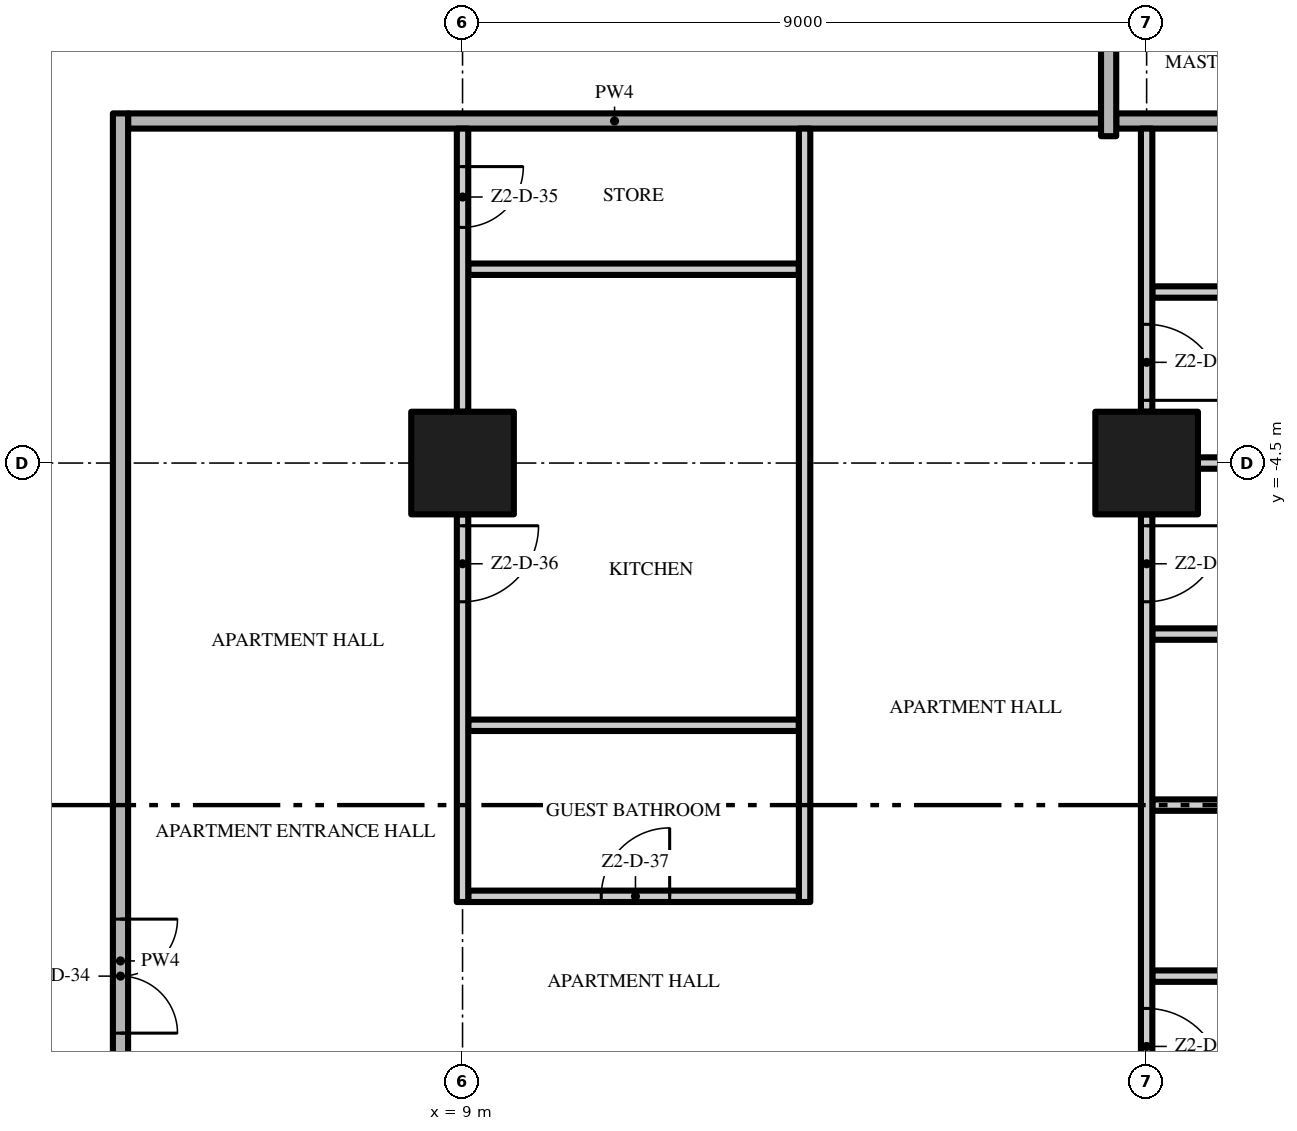
"""IFC4 building model, lengths in metres.
Left out: names, types, materials, properties, quantities, classifications, styles, units other than length and angle.
Written with IfcOpenShell. Run it as: python <this file> out.ifc"""

import sys

from ifc_helpers import new_model, si_unit, direction, frame, frame_2d, origin, origin_2d, place, context, subcontext, project, spatial, rectangle, extrude, element, fill, save


model = new_model("IFC4")
c1 = context("Model", 3, precision=1e-05, world=origin(), true_north=direction((0.0, 1.0)))
c2 = subcontext(c1, "Body", "Model", "MODEL_VIEW")
j1 = project(units=[si_unit("LENGTHUNIT", "METRE"), si_unit("PLANEANGLEUNIT", "RADIAN")], contexts=[c1])
p1 = place(None, origin())
s1 = spatial("IfcSite", under=j1, at=p1, CompositionType="ELEMENT")
p2 = place(p1, origin())
s2 = spatial("IfcBuilding", under=s1, at=p2, CompositionType="ELEMENT")
p3 = place(p2, frame((0.0, 0.0, 107.4)))
s3 = spatial("IfcBuildingStorey", under=s2, at=p3, CompositionType="ELEMENT", Elevation=107.4)
for number, where, z_axis, x_axis in (
    (1, (18.0, -4.5, 0.0), (0.0, 0.0, 1.0), (1.0, 0.0, 0.0)),
    (2, (9.0, -4.5, 0.0), (0.0, 0.0, 1.0), (1.0, 0.0, 0.0)),
):
    element("IfcColumn", number, at=place(p3, frame(where, z_axis=z_axis, x_axis=x_axis)), inside=s3, PredefinedType="COLUMN", context=c2, shape_type="SweptSolid", body=[
        extrude(rectangle(XDim=1.35, YDim=1.35, at=origin_2d()), origin(), (0.0, 0.0, 1.0), 3.5),
    ])
p4 = place(p3, frame((18.075, -11.25, 0.0), z_axis=(0.0, 0.0, 1.0), x_axis=(1.0, 0.0, 0.0)))
e3 = element("IfcWall", 3, at=p4, inside=s3, PredefinedType="PARTITIONING", context=c2, shape_type="SweptSolid", body=[
    extrude(rectangle(XDim=2.85, YDim=0.15, at=frame_2d((1.425, 0.0))), origin(), (0.0, 0.0, 1.0), 3.5),
])
p5 = place(p3, frame((9.075, -10.2, 0.0), z_axis=(0.0, 0.0, 1.0), x_axis=(1.0, 0.0, 0.0)))
e4 = element("IfcWall", 4, at=p5, inside=s3, PredefinedType="PARTITIONING", context=c2, shape_type="SweptSolid", body=[
    extrude(rectangle(XDim=4.35, YDim=0.15, at=frame_2d((2.175, 0.0))), origin(), (0.0, 0.0, 1.0), 3.5),
])
p6 = place(p5, frame((1.75, 0.0, 0.0)))
e5 = element("IfcOpeningElement", 5, at=p6, cuts=e4, PredefinedType="OPENING", context=c2, shape_type="SweptSolid", body=[
    extrude(rectangle(XDim=0.9, YDim=2.1, at=frame_2d((0.45, 1.05))), frame((0.0, 0.085, 0.0), z_axis=(0.0, -1.0, 0.0), x_axis=(1.0, 0.0, 0.0)), (0.0, 0.0, 1.0), 0.17),
])
p7 = place(p3, frame((18.075, -9.0, 0.0), z_axis=(0.0, 0.0, 1.0), x_axis=(1.0, 0.0, 0.0)))
e6 = element("IfcWall", 6, at=p7, inside=s3, PredefinedType="PARTITIONING", context=c2, shape_type="SweptSolid", body=[
    extrude(rectangle(XDim=2.85, YDim=0.15, at=frame_2d((1.425, 0.0))), origin(), (0.0, 0.0, 1.0), 3.5),
])
p8 = place(p3, frame((9.075, -7.95, 0.0), z_axis=(0.0, 0.0, 1.0), x_axis=(1.0, 0.0, 0.0)))
e7 = element("IfcWall", 7, at=p8, inside=s3, PredefinedType="PARTITIONING", context=c2, shape_type="SweptSolid", body=[
    extrude(rectangle(XDim=4.35, YDim=0.15, at=frame_2d((2.175, 0.0))), origin(), (0.0, 0.0, 1.0), 3.5),
])
p9 = place(p3, frame((18.075, -6.75, 0.0), z_axis=(0.0, 0.0, 1.0), x_axis=(1.0, 0.0, 0.0)))
e8 = element("IfcWall", 8, at=p9, inside=s3, PredefinedType="PARTITIONING", context=c2, shape_type="SweptSolid", body=[
    extrude(rectangle(XDim=2.85, YDim=0.15, at=frame_2d((1.425, 0.0))), origin(), (0.0, 0.0, 1.0), 3.5),
])
p10 = place(p3, frame((18.675, -4.5, 0.0), z_axis=(0.0, 0.0, 1.0), x_axis=(1.0, 0.0, 0.0)))
e9 = element("IfcWall", 9, at=p10, inside=s3, PredefinedType="PARTITIONING", context=c2, shape_type="SweptSolid", body=[
    extrude(rectangle(XDim=7.075, YDim=0.15, at=frame_2d((3.538, 0.0))), origin(), (0.0, 0.0, 1.0), 3.5),
])
p11 = place(p3, frame((18.075, -2.25, 0.0), z_axis=(0.0, 0.0, 1.0), x_axis=(1.0, 0.0, 0.0)))
e10 = element("IfcWall", 10, at=p11, inside=s3, PredefinedType="PARTITIONING", context=c2, shape_type="SweptSolid", body=[
    extrude(rectangle(XDim=2.85, YDim=0.15, at=frame_2d((1.425, 0.0))), origin(), (0.0, 0.0, 1.0), 3.5),
])
p12 = place(p3, frame((9.075, -1.95, 0.0), z_axis=(0.0, 0.0, 1.0), x_axis=(1.0, 0.0, 0.0)))
e11 = element("IfcWall", 11, at=p12, inside=s3, PredefinedType="PARTITIONING", context=c2, shape_type="SweptSolid", body=[
    extrude(rectangle(XDim=4.35, YDim=0.15, at=frame_2d((2.175, 0.0))), origin(), (0.0, 0.0, 1.0), 3.5),
])
p13 = place(p3, frame((4.6, 0.0, 0.0), z_axis=(0.0, 0.0, 1.0), x_axis=(1.0, 0.0, 0.0)))
e12 = element("IfcWall", 12, at=p13, inside=s3, PredefinedType="PARTITIONING", context=c2, shape_type="SweptSolid", body=[
    extrude(rectangle(XDim=12.8, YDim=0.2, at=frame_2d((6.4, 0.0))), origin(), (0.0, 0.0, 1.0), 3.5),
])
p14 = place(p3, frame((17.6, 0.0, 0.0), z_axis=(0.0, 0.0, 1.0), x_axis=(1.0, 0.0, 0.0)))
e13 = element("IfcWall", 13, at=p14, inside=s3, PredefinedType="PARTITIONING", context=c2, shape_type="SweptSolid", body=[
    extrude(rectangle(XDim=9.1, YDim=0.2, at=frame_2d((4.55, 0.0))), origin(), (0.0, 0.0, 1.0), 3.5),
])
p15 = place(p3, frame((4.5, 0.1, 0.0), z_axis=(0.0, 0.0, 1.0), x_axis=(0.0, -1.0, 0.0)))
e14 = element("IfcWall", 14, at=p15, inside=s3, PredefinedType="PARTITIONING", context=c2, shape_type="SweptSolid", body=[
    extrude(rectangle(XDim=22.3, YDim=0.2, at=frame_2d((11.15, 0.0))), origin(), (0.0, 0.0, 1.0), 3.5),
])
p16 = place(p15, frame((10.6, 0.0, 0.0)))
e15 = element("IfcOpeningElement", 15, at=p16, cuts=e14, PredefinedType="OPENING", context=c2, shape_type="SweptSolid", body=[
    extrude(rectangle(XDim=1.5, YDim=2.4, at=frame_2d((0.75, 1.2))), frame((0.0, 0.11, 0.0), z_axis=(0.0, -1.0, 0.0), x_axis=(1.0, 0.0, 0.0)), (0.0, 0.0, 1.0), 0.22),
])
p17 = place(p3, frame((9.0, -5.175, 0.0), z_axis=(0.0, 0.0, 1.0), x_axis=(0.0, -1.0, 0.0)))
e16 = element("IfcWall", 16, at=p17, inside=s3, PredefinedType="PARTITIONING", context=c2, shape_type="SweptSolid", body=[
    extrude(rectangle(XDim=5.1, YDim=0.15, at=frame_2d((2.55, 0.0))), origin(), (0.0, 0.0, 1.0), 3.5),
])
p18 = place(p17, frame((0.15, 0.0, 0.0)))
e17 = element("IfcOpeningElement", 17, at=p18, cuts=e16, PredefinedType="OPENING", context=c2, shape_type="SweptSolid", body=[
    extrude(rectangle(XDim=1.0, YDim=2.4, at=frame_2d((0.5, 1.2))), frame((0.0, 0.085, 0.0), z_axis=(0.0, -1.0, 0.0), x_axis=(1.0, 0.0, 0.0)), (0.0, 0.0, 1.0), 0.17),
])
p19 = place(p3, frame((9.0, -0.1, 0.0), z_axis=(0.0, 0.0, 1.0), x_axis=(0.0, -1.0, 0.0)))
e18 = element("IfcWall", 18, at=p19, inside=s3, PredefinedType="PARTITIONING", context=c2, shape_type="SweptSolid", body=[
    extrude(rectangle(XDim=3.725, YDim=0.15, at=frame_2d((1.863, 0.0))), origin(), (0.0, 0.0, 1.0), 3.5),
])
p20 = place(p19, frame((0.5, 0.0, 0.0)))
e19 = element("IfcOpeningElement", 19, at=p20, cuts=e18, PredefinedType="OPENING", context=c2, shape_type="SweptSolid", body=[
    extrude(rectangle(XDim=0.8, YDim=2.0, at=frame_2d((0.4, 1.0))), frame((0.0, 0.085, 0.0), z_axis=(0.0, -1.0, 0.0), x_axis=(1.0, 0.0, 0.0)), (0.0, 0.0, 1.0), 0.17),
])
p21 = place(p3, frame((13.5, -10.275, 0.0), z_axis=(0.0, 0.0, 1.0), x_axis=(0.0, 1.0, 0.0)))
e20 = element("IfcWall", 20, at=p21, inside=s3, PredefinedType="PARTITIONING", context=c2, shape_type="SweptSolid", body=[
    extrude(rectangle(XDim=10.175, YDim=0.15, at=frame_2d((5.088, 0.0))), origin(), (0.0, 0.0, 1.0), 3.5),
])
p22 = place(p3, frame((17.5, -0.2, 0.0), z_axis=(0.0, 0.0, 1.0), x_axis=(0.0, 1.0, 0.0)))
e21 = element("IfcWall", 21, at=p22, inside=s3, PredefinedType="PARTITIONING", context=c2, shape_type="SweptSolid", body=[
    extrude(rectangle(XDim=4.025, YDim=0.2, at=frame_2d((2.013, 0.0))), origin(), (0.0, 0.0, 1.0), 3.5),
])
p23 = place(p3, frame((18.0, -5.175, 0.0), z_axis=(0.0, 0.0, 1.0), x_axis=(0.0, -1.0, 0.0)))
e22 = element("IfcWall", 22, at=p23, inside=s3, PredefinedType="PARTITIONING", context=c2, shape_type="SweptSolid", body=[
    extrude(rectangle(XDim=7.65, YDim=0.15, at=frame_2d((3.825, 0.0))), origin(), (0.0, 0.0, 1.0), 3.5),
])
p24 = place(p23, frame((0.15, 0.0, 0.0)))
e23 = element("IfcOpeningElement", 23, at=p24, cuts=e22, PredefinedType="OPENING", context=c2, shape_type="SweptSolid", body=[
    extrude(rectangle(XDim=1.0, YDim=2.4, at=frame_2d((0.5, 1.2))), frame((0.0, 0.085, 0.0), z_axis=(0.0, -1.0, 0.0), x_axis=(1.0, 0.0, 0.0)), (0.0, 0.0, 1.0), 0.17),
])
p25 = place(p23, frame((6.5, 0.0, 0.0)))
e24 = element("IfcOpeningElement", 24, at=p25, cuts=e22, PredefinedType="OPENING", context=c2, shape_type="SweptSolid", body=[
    extrude(rectangle(XDim=1.0, YDim=2.4, at=frame_2d((0.5, 1.2))), frame((0.0, 0.085, 0.0), z_axis=(0.0, -1.0, 0.0), x_axis=(1.0, 0.0, 0.0)), (0.0, 0.0, 1.0), 0.17),
])
p26 = place(p3, frame((18.0, -0.1, 0.0), z_axis=(0.0, 0.0, 1.0), x_axis=(0.0, -1.0, 0.0)))
e25 = element("IfcWall", 25, at=p26, inside=s3, PredefinedType="PARTITIONING", context=c2, shape_type="SweptSolid", body=[
    extrude(rectangle(XDim=3.725, YDim=0.15, at=frame_2d((1.863, 0.0))), origin(), (0.0, 0.0, 1.0), 3.5),
])
p27 = place(p26, frame((2.575, 0.0, 0.0)))
e26 = element("IfcOpeningElement", 26, at=p27, cuts=e25, PredefinedType="OPENING", context=c2, shape_type="SweptSolid", body=[
    extrude(rectangle(XDim=1.0, YDim=2.4, at=frame_2d((0.5, 1.2))), frame((0.0, 0.085, 0.0), z_axis=(0.0, -1.0, 0.0), x_axis=(1.0, 0.0, 0.0)), (0.0, 0.0, 1.0), 0.17),
])
p28 = place(p16, origin())
e27 = element("IfcDoor", 27, at=p28, inside=s3, OperationType="DOUBLE_DOOR_SINGLE_SWING", PredefinedType="DOOR", context=c2, shape_type="SweptSolid", body=[
    extrude(rectangle(XDim=1.5, YDim=2.4, at=frame_2d((0.75, 1.2))), frame((0.0, 0.025, 0.0), z_axis=(0.0, -1.0, 0.0), x_axis=(1.0, 0.0, 0.0)), (0.0, 0.0, 1.0), 0.05),
])
fill(e15, e27)
p29 = place(p20, origin())
e28 = element("IfcDoor", 28, at=p29, inside=s3, OperationType="SINGLE_SWING_LEFT", PredefinedType="DOOR", context=c2, shape_type="SweptSolid", body=[
    extrude(rectangle(XDim=0.8, YDim=2.0, at=frame_2d((0.4, 1.0))), frame((0.0, 0.025, 0.0), z_axis=(0.0, -1.0, 0.0), x_axis=(1.0, 0.0, 0.0)), (0.0, 0.0, 1.0), 0.05),
])
fill(e19, e28)
p30 = place(p18, origin())
e29 = element("IfcDoor", 29, at=p30, inside=s3, OperationType="SINGLE_SWING_LEFT", PredefinedType="DOOR", context=c2, shape_type="SweptSolid", body=[
    extrude(rectangle(XDim=1.0, YDim=2.4, at=frame_2d((0.5, 1.2))), frame((0.0, 0.025, 0.0), z_axis=(0.0, -1.0, 0.0), x_axis=(1.0, 0.0, 0.0)), (0.0, 0.0, 1.0), 0.05),
])
fill(e17, e29)
p31 = place(p6, origin())
e30 = element("IfcDoor", 30, at=p31, inside=s3, OperationType="SINGLE_SWING_RIGHT", PredefinedType="DOOR", context=c2, shape_type="SweptSolid", body=[
    extrude(rectangle(XDim=0.9, YDim=2.1, at=frame_2d((0.45, 1.05))), frame((0.0, 0.025, 0.0), z_axis=(0.0, -1.0, 0.0), x_axis=(1.0, 0.0, 0.0)), (0.0, 0.0, 1.0), 0.05),
])
fill(e5, e30)
p32 = place(p27, origin())
e31 = element("IfcDoor", 31, at=p32, inside=s3, OperationType="SINGLE_SWING_RIGHT", PredefinedType="DOOR", context=c2, shape_type="SweptSolid", body=[
    extrude(rectangle(XDim=1.0, YDim=2.4, at=frame_2d((0.5, 1.2))), frame((0.0, 0.025, 0.0), z_axis=(0.0, -1.0, 0.0), x_axis=(1.0, 0.0, 0.0)), (0.0, 0.0, 1.0), 0.05),
])
fill(e26, e31)
p33 = place(p24, origin())
e32 = element("IfcDoor", 32, at=p33, inside=s3, OperationType="SINGLE_SWING_LEFT", PredefinedType="DOOR", context=c2, shape_type="SweptSolid", body=[
    extrude(rectangle(XDim=1.0, YDim=2.4, at=frame_2d((0.5, 1.2))), frame((0.0, 0.025, 0.0), z_axis=(0.0, -1.0, 0.0), x_axis=(1.0, 0.0, 0.0)), (0.0, 0.0, 1.0), 0.05),
])
fill(e23, e32)
p34 = place(p25, origin())
e33 = element("IfcDoor", 33, at=p34, inside=s3, OperationType="SINGLE_SWING_RIGHT", PredefinedType="DOOR", context=c2, shape_type="SweptSolid", body=[
    extrude(rectangle(XDim=1.0, YDim=2.4, at=frame_2d((0.5, 1.2))), frame((0.0, 0.025, 0.0), z_axis=(0.0, -1.0, 0.0), x_axis=(1.0, 0.0, 0.0)), (0.0, 0.0, 1.0), 0.05),
])
fill(e24, e33)
save(model, sys.argv[1])
